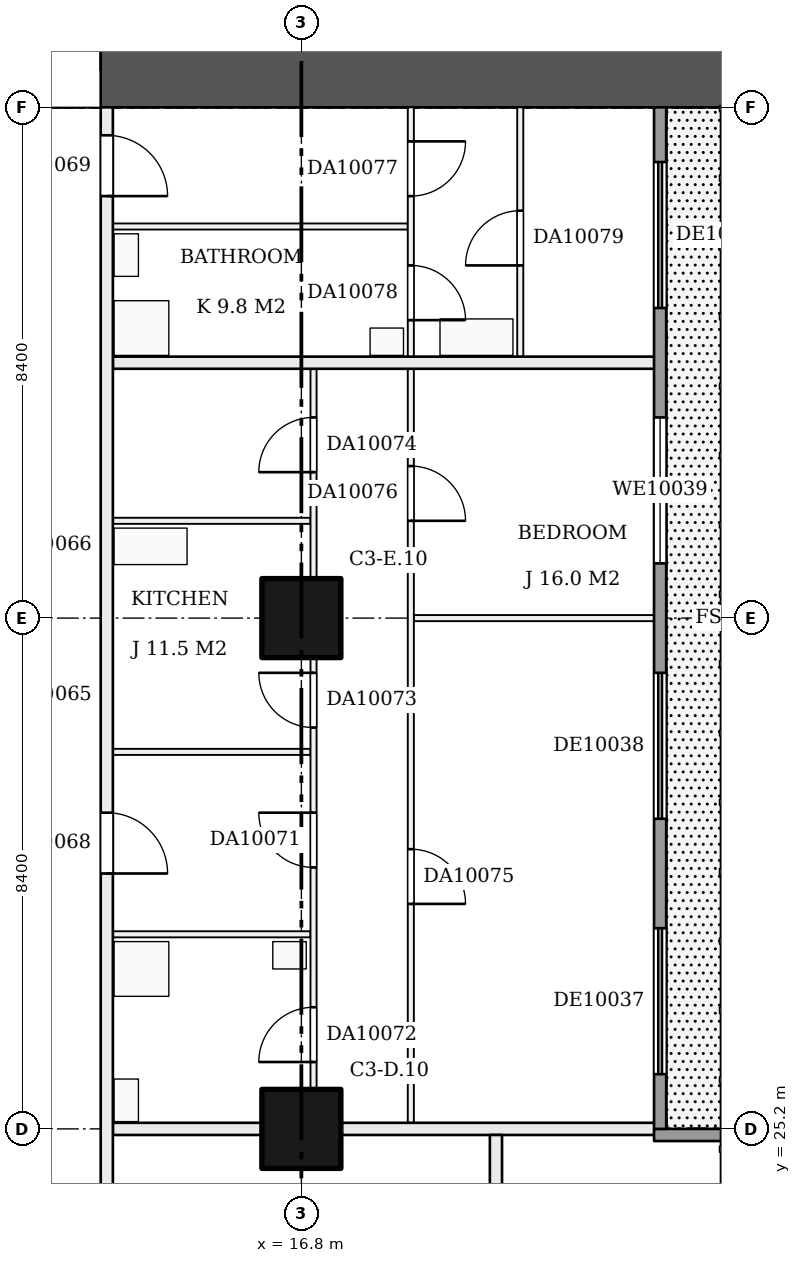
"""IFC4 building model, lengths in metres.
Left out: names, types, materials, properties, quantities, classifications, styles, units other than length and angle.
Written with IfcOpenShell. Run it as: python <this file> out.ifc"""

import sys

from ifc_helpers import new_model, si_unit, direction, frame, frame_2d, origin, origin_2d, place, context, subcontext, project, spatial, rectangle, extrude, element, fill, save


model = new_model("IFC4")
c1 = context("Model", 3, precision=1e-05, world=origin(), true_north=direction((0.0, 1.0)))
c2 = subcontext(c1, "Body", "Model", "MODEL_VIEW")
j1 = project(units=[si_unit("LENGTHUNIT", "METRE"), si_unit("PLANEANGLEUNIT", "RADIAN")], contexts=[c1])
p1 = place(None, origin())
s1 = spatial("IfcSite", under=j1, at=p1, CompositionType="ELEMENT")
p2 = place(p1, origin())
s2 = spatial("IfcBuilding", under=s1, at=p2, CompositionType="ELEMENT")
p3 = place(p2, frame((0.0, 0.0, 46.2)))
s3 = spatial("IfcBuildingStorey", under=s2, at=p3, CompositionType="ELEMENT", Elevation=46.2)
for number, where, z_axis, x_axis in (
    (1, (16.8, 25.2, 0.0), (0.0, 0.0, 1.0), (1.0, 0.0, 0.0)),
    (2, (16.8, 33.6, 0.0), (0.0, 0.0, 1.0), (1.0, 0.0, 0.0)),
):
    element("IfcColumn", number, at=place(p3, frame(where, z_axis=z_axis, x_axis=x_axis)), inside=s3, PredefinedType="COLUMN", context=c2, shape_type="SweptSolid", body=[
        extrude(rectangle(XDim=1.3, YDim=1.3, at=origin_2d()), origin(), (0.0, 0.0, 1.0), 3.22),
    ])
p4 = place(p3, frame((9.6, 42.6, 0.0), z_axis=(0.0, 0.0, 1.0), x_axis=(1.0, 0.0, 0.0)))
e3 = element("IfcWall", 3, at=p4, inside=s3, PredefinedType="SHEAR", context=c2, shape_type="SweptSolid", body=[
    extrude(rectangle(XDim=14.4, YDim=1.2, at=frame_2d((7.2, 0.0))), origin(), (0.0, 0.0, 1.0), 3.22),
])
p5 = place(p4, frame((2.1, 0.0, 0.0)))
e4 = element("IfcOpeningElement", 4, at=p5, cuts=e3, PredefinedType="OPENING", context=c2, shape_type="SweptSolid", body=[
    extrude(rectangle(XDim=1.8, YDim=2.1, at=frame_2d((0.9, 1.05))), frame((0.0, 0.61, 0.0), z_axis=(0.0, -1.0, 0.0), x_axis=(1.0, 0.0, 0.0)), (0.0, 0.0, 1.0), 1.22),
])
p6 = place(p3, frame((13.7, 25.2, 0.0), z_axis=(0.0, 0.0, 1.0), x_axis=(1.0, 0.0, 0.0)))
e5 = element("IfcWall", 5, at=p6, inside=s3, PredefinedType="PARTITIONING", context=c2, shape_type="SweptSolid", body=[
    extrude(rectangle(XDim=9.0, YDim=0.2, at=frame_2d((4.5, 0.0))), origin(), (0.0, 0.0, 1.0), 3.22),
])
for number, where, z_axis, x_axis in (
    (6, (13.7, 28.4, 0.0), (0.0, 0.0, 1.0), (1.0, 0.0, 0.0)),
    (7, (13.7, 31.4, 0.0), (0.0, 0.0, 1.0), (1.0, 0.0, 0.0)),
):
    element("IfcWall", number, at=place(p3, frame(where, z_axis=z_axis, x_axis=x_axis)), inside=s3, PredefinedType="PARTITIONING", context=c2, shape_type="SweptSolid", body=[
        extrude(rectangle(XDim=3.25, YDim=0.1, at=frame_2d((1.625, 0.0))), origin(), (0.0, 0.0, 1.0), 3.22),
    ])
p7 = place(p3, frame((18.65, 33.6, 0.0), z_axis=(0.0, 0.0, 1.0), x_axis=(1.0, 0.0, 0.0)))
e8 = element("IfcWall", 8, at=p7, inside=s3, PredefinedType="PARTITIONING", context=c2, shape_type="SweptSolid", body=[
    extrude(rectangle(XDim=4.05, YDim=0.1, at=frame_2d((2.025, 0.0))), origin(), (0.0, 0.0, 1.0), 3.22),
])
p8 = place(p3, frame((13.7, 35.2, 0.0), z_axis=(0.0, 0.0, 1.0), x_axis=(1.0, 0.0, 0.0)))
e9 = element("IfcWall", 9, at=p8, inside=s3, PredefinedType="PARTITIONING", context=c2, shape_type="SweptSolid", body=[
    extrude(rectangle(XDim=3.25, YDim=0.1, at=frame_2d((1.625, 0.0))), origin(), (0.0, 0.0, 1.0), 3.22),
])
p9 = place(p3, frame((13.7, 37.8, 0.0), z_axis=(0.0, 0.0, 1.0), x_axis=(1.0, 0.0, 0.0)))
e10 = element("IfcWall", 10, at=p9, inside=s3, PredefinedType="PARTITIONING", context=c2, shape_type="SweptSolid", body=[
    extrude(rectangle(XDim=9.0, YDim=0.2, at=frame_2d((4.5, 0.0))), origin(), (0.0, 0.0, 1.0), 3.22),
])
p10 = place(p3, frame((13.7, 40.04, 0.0), z_axis=(0.0, 0.0, 1.0), x_axis=(1.0, 0.0, 0.0)))
e11 = element("IfcWall", 11, at=p10, inside=s3, PredefinedType="PARTITIONING", context=c2, shape_type="SweptSolid", body=[
    extrude(rectangle(XDim=4.85, YDim=0.1, at=frame_2d((2.425, 0.0))), origin(), (0.0, 0.0, 1.0), 3.22),
])
p11 = place(p3, frame((13.6, 20.8, 0.0), z_axis=(0.0, 0.0, 1.0), x_axis=(0.0, 1.0, 0.0)))
e12 = element("IfcWall", 12, at=p11, inside=s3, PredefinedType="PARTITIONING", context=c2, shape_type="SweptSolid", body=[
    extrude(rectangle(XDim=21.2, YDim=0.2, at=frame_2d((10.6, 0.0))), origin(), (0.0, 0.0, 1.0), 3.22),
])
p12 = place(p11, frame((8.6, 0.0, 0.0)))
e13 = element("IfcOpeningElement", 13, at=p12, cuts=e12, PredefinedType="OPENING", context=c2, shape_type="SweptSolid", body=[
    extrude(rectangle(XDim=1.0, YDim=2.1, at=frame_2d((0.5, 1.05))), frame((0.0, 0.11, 0.0), z_axis=(0.0, -1.0, 0.0), x_axis=(1.0, 0.0, 0.0)), (0.0, 0.0, 1.0), 0.22),
])
p13 = place(p11, frame((19.74, 0.0, 0.0)))
e14 = element("IfcOpeningElement", 14, at=p13, cuts=e12, PredefinedType="OPENING", context=c2, shape_type="SweptSolid", body=[
    extrude(rectangle(XDim=1.0, YDim=2.1, at=frame_2d((0.5, 1.05))), frame((0.0, 0.11, 0.0), z_axis=(0.0, -1.0, 0.0), x_axis=(1.0, 0.0, 0.0)), (0.0, 0.0, 1.0), 0.22),
])
p14 = place(p11, frame((1.7, 0.0, 0.0)))
e15 = element("IfcOpeningElement", 15, at=p14, cuts=e12, PredefinedType="OPENING", context=c2, shape_type="SweptSolid", body=[
    extrude(rectangle(XDim=1.0, YDim=2.1, at=frame_2d((0.5, 1.05))), frame((0.0, 0.11, 0.0), z_axis=(0.0, -1.0, 0.0), x_axis=(1.0, 0.0, 0.0)), (0.0, 0.0, 1.0), 0.22),
])
p15 = place(p3, frame((17.0, 25.3, 0.0), z_axis=(0.0, 0.0, 1.0), x_axis=(0.0, 1.0, 0.0)))
e16 = element("IfcWall", 16, at=p15, inside=s3, PredefinedType="PARTITIONING", context=c2, shape_type="SweptSolid", body=[
    extrude(rectangle(XDim=12.4, YDim=0.1, at=frame_2d((6.2, 0.0))), origin(), (0.0, 0.0, 1.0), 3.22),
])
p16 = place(p15, frame((4.2, 0.0, 0.0)))
e17 = element("IfcOpeningElement", 17, at=p16, cuts=e16, PredefinedType="OPENING", context=c2, shape_type="SweptSolid", body=[
    extrude(rectangle(XDim=0.9, YDim=2.1, at=frame_2d((0.45, 1.05))), frame((0.0, 0.06, 0.0), z_axis=(0.0, -1.0, 0.0), x_axis=(1.0, 0.0, 0.0)), (0.0, 0.0, 1.0), 0.12),
])
p17 = place(p15, frame((1.0, 0.0, 0.0)))
e18 = element("IfcOpeningElement", 18, at=p17, cuts=e16, PredefinedType="OPENING", context=c2, shape_type="SweptSolid", body=[
    extrude(rectangle(XDim=0.9, YDim=2.1, at=frame_2d((0.45, 1.05))), frame((0.0, 0.06, 0.0), z_axis=(0.0, -1.0, 0.0), x_axis=(1.0, 0.0, 0.0)), (0.0, 0.0, 1.0), 0.12),
])
p18 = place(p15, frame((6.5, 0.0, 0.0)))
e19 = element("IfcOpeningElement", 19, at=p18, cuts=e16, PredefinedType="OPENING", context=c2, shape_type="SweptSolid", body=[
    extrude(rectangle(XDim=0.9, YDim=2.1, at=frame_2d((0.45, 1.05))), frame((0.0, 0.06, 0.0), z_axis=(0.0, -1.0, 0.0), x_axis=(1.0, 0.0, 0.0)), (0.0, 0.0, 1.0), 0.12),
])
p19 = place(p15, frame((10.7, 0.0, 0.0)))
e20 = element("IfcOpeningElement", 20, at=p19, cuts=e16, PredefinedType="OPENING", context=c2, shape_type="SweptSolid", body=[
    extrude(rectangle(XDim=0.9, YDim=2.1, at=frame_2d((0.45, 1.05))), frame((0.0, 0.06, 0.0), z_axis=(0.0, -1.0, 0.0), x_axis=(1.0, 0.0, 0.0)), (0.0, 0.0, 1.0), 0.12),
])
p20 = place(p3, frame((18.6, 25.3, 0.0), z_axis=(0.0, 0.0, 1.0), x_axis=(0.0, 1.0, 0.0)))
e21 = element("IfcWall", 21, at=p20, inside=s3, PredefinedType="PARTITIONING", context=c2, shape_type="SweptSolid", body=[
    extrude(rectangle(XDim=16.7, YDim=0.1, at=frame_2d((8.35, 0.0))), origin(), (0.0, 0.0, 1.0), 3.22),
])
p21 = place(p20, frame((3.6, 0.0, 0.0)))
e22 = element("IfcOpeningElement", 22, at=p21, cuts=e21, PredefinedType="OPENING", context=c2, shape_type="SweptSolid", body=[
    extrude(rectangle(XDim=0.9, YDim=2.1, at=frame_2d((0.45, 1.05))), frame((0.0, 0.06, 0.0), z_axis=(0.0, -1.0, 0.0), x_axis=(1.0, 0.0, 0.0)), (0.0, 0.0, 1.0), 0.12),
])
p22 = place(p20, frame((9.9, 0.0, 0.0)))
e23 = element("IfcOpeningElement", 23, at=p22, cuts=e21, PredefinedType="OPENING", context=c2, shape_type="SweptSolid", body=[
    extrude(rectangle(XDim=0.9, YDim=2.1, at=frame_2d((0.45, 1.05))), frame((0.0, 0.06, 0.0), z_axis=(0.0, -1.0, 0.0), x_axis=(1.0, 0.0, 0.0)), (0.0, 0.0, 1.0), 0.12),
])
p23 = place(p20, frame((15.24, 0.0, 0.0)))
e24 = element("IfcOpeningElement", 24, at=p23, cuts=e21, PredefinedType="OPENING", context=c2, shape_type="SweptSolid", body=[
    extrude(rectangle(XDim=0.9, YDim=2.1, at=frame_2d((0.45, 1.05))), frame((0.0, 0.06, 0.0), z_axis=(0.0, -1.0, 0.0), x_axis=(1.0, 0.0, 0.0)), (0.0, 0.0, 1.0), 0.12),
])
p24 = place(p20, frame((13.2, 0.0, 0.0)))
e25 = element("IfcOpeningElement", 25, at=p24, cuts=e21, PredefinedType="OPENING", context=c2, shape_type="SweptSolid", body=[
    extrude(rectangle(XDim=0.9, YDim=2.1, at=frame_2d((0.45, 1.05))), frame((0.0, 0.06, 0.0), z_axis=(0.0, -1.0, 0.0), x_axis=(1.0, 0.0, 0.0)), (0.0, 0.0, 1.0), 0.12),
])
p25 = place(p3, frame((20.0, 13.7, 0.0), z_axis=(0.0, 0.0, 1.0), x_axis=(0.0, 1.0, 0.0)))
e26 = element("IfcWall", 26, at=p25, inside=s3, PredefinedType="PARTITIONING", context=c2, shape_type="SweptSolid", body=[
    extrude(rectangle(XDim=11.4, YDim=0.2, at=frame_2d((5.7, 0.0))), origin(), (0.0, 0.0, 1.0), 3.22),
])
p26 = place(p3, frame((20.4, 37.9, 0.0), z_axis=(0.0, 0.0, 1.0), x_axis=(0.0, 1.0, 0.0)))
e27 = element("IfcWall", 27, at=p26, inside=s3, PredefinedType="PARTITIONING", context=c2, shape_type="SweptSolid", body=[
    extrude(rectangle(XDim=4.1, YDim=0.1, at=frame_2d((2.05, 0.0))), origin(), (0.0, 0.0, 1.0), 3.22),
])
p27 = place(p26, frame((1.5, 0.0, 0.0)))
e28 = element("IfcOpeningElement", 28, at=p27, cuts=e27, PredefinedType="OPENING", context=c2, shape_type="SweptSolid", body=[
    extrude(rectangle(XDim=0.9, YDim=2.1, at=frame_2d((0.45, 1.05))), frame((0.0, 0.06, 0.0), z_axis=(0.0, -1.0, 0.0), x_axis=(1.0, 0.0, 0.0)), (0.0, 0.0, 1.0), 0.12),
])
p28 = place(p3, frame((24.5, 25.1, 0.0), z_axis=(0.0, 0.0, 1.0), x_axis=(-1.0, 0.0, 0.0)))
e29 = element("IfcWall", 29, at=p28, inside=s3, PredefinedType="SOLIDWALL", context=c2, shape_type="SweptSolid", body=[
    extrude(rectangle(XDim=1.9, YDim=0.2, at=frame_2d((0.95, 0.0))), origin(), (0.0, 0.0, 1.0), 3.22),
])
p29 = place(p3, frame((22.7, 25.2, 0.0), z_axis=(0.0, 0.0, 1.0), x_axis=(0.0, 1.0, 0.0)))
e30 = element("IfcWall", 30, at=p29, inside=s3, PredefinedType="SOLIDWALL", context=c2, shape_type="SweptSolid", body=[
    extrude(rectangle(XDim=16.8, YDim=0.2, at=frame_2d((8.4, 0.0))), origin(), (0.0, 0.0, 1.0), 3.22),
])
p30 = place(p29, frame((0.9, 0.0, 0.0)))
e31 = element("IfcOpeningElement", 31, at=p30, cuts=e30, PredefinedType="OPENING", context=c2, shape_type="SweptSolid", body=[
    extrude(rectangle(XDim=2.4, YDim=2.2, at=frame_2d((1.2, 1.1))), frame((0.0, 0.11, 0.0), z_axis=(0.0, -1.0, 0.0), x_axis=(1.0, 0.0, 0.0)), (0.0, 0.0, 1.0), 0.22),
])
p31 = place(p29, frame((5.1, 0.0, 0.0)))
e32 = element("IfcOpeningElement", 32, at=p31, cuts=e30, PredefinedType="OPENING", context=c2, shape_type="SweptSolid", body=[
    extrude(rectangle(XDim=2.4, YDim=2.2, at=frame_2d((1.2, 1.1))), frame((0.0, 0.11, 0.0), z_axis=(0.0, -1.0, 0.0), x_axis=(1.0, 0.0, 0.0)), (0.0, 0.0, 1.0), 0.22),
])
p32 = place(p29, frame((9.3, 0.0, 0.9)))
e33 = element("IfcOpeningElement", 33, at=p32, cuts=e30, PredefinedType="OPENING", context=c2, shape_type="SweptSolid", body=[
    extrude(rectangle(XDim=2.4, YDim=1.5, at=frame_2d((1.2, 0.75))), frame((0.0, 0.11, 0.0), z_axis=(0.0, -1.0, 0.0), x_axis=(1.0, 0.0, 0.0)), (0.0, 0.0, 1.0), 0.22),
])
p33 = place(p29, frame((13.5, 0.0, 0.0)))
e34 = element("IfcOpeningElement", 34, at=p33, cuts=e30, PredefinedType="OPENING", context=c2, shape_type="SweptSolid", body=[
    extrude(rectangle(XDim=2.4, YDim=2.2, at=frame_2d((1.2, 1.1))), frame((0.0, 0.11, 0.0), z_axis=(0.0, -1.0, 0.0), x_axis=(1.0, 0.0, 0.0)), (0.0, 0.0, 1.0), 0.22),
])
p34 = place(p5, origin())
e35 = element("IfcDoor", 35, at=p34, inside=s3, OperationType="DOUBLE_DOOR_SINGLE_SWING", PredefinedType="DOOR", context=c2, shape_type="SweptSolid", body=[
    extrude(rectangle(XDim=1.8, YDim=2.1, at=frame_2d((0.9, 1.05))), frame((0.0, 0.025, 0.0), z_axis=(0.0, -1.0, 0.0), x_axis=(1.0, 0.0, 0.0)), (0.0, 0.0, 1.0), 0.05),
])
fill(e4, e35)
p35 = place(p12, frame((1.0, 0.0, 0.0), z_axis=(0.0, 0.0, 1.0), x_axis=(-1.0, 0.0, 0.0)))
e36 = element("IfcDoor", 36, at=p35, inside=s3, OperationType="SINGLE_SWING_RIGHT", PredefinedType="DOOR", context=c2, shape_type="SweptSolid", body=[
    extrude(rectangle(XDim=1.0, YDim=2.1, at=frame_2d((0.5, 1.05))), frame((0.0, 0.025, 0.0), z_axis=(0.0, -1.0, 0.0), x_axis=(1.0, 0.0, 0.0)), (0.0, 0.0, 1.0), 0.05),
])
fill(e13, e36)
p36 = place(p13, frame((1.0, 0.0, 0.0), z_axis=(0.0, 0.0, 1.0), x_axis=(-1.0, 0.0, 0.0)))
e37 = element("IfcDoor", 37, at=p36, inside=s3, OperationType="SINGLE_SWING_RIGHT", PredefinedType="DOOR", context=c2, shape_type="SweptSolid", body=[
    extrude(rectangle(XDim=1.0, YDim=2.1, at=frame_2d((0.5, 1.05))), frame((0.0, 0.025, 0.0), z_axis=(0.0, -1.0, 0.0), x_axis=(1.0, 0.0, 0.0)), (0.0, 0.0, 1.0), 0.05),
])
fill(e14, e37)
p37 = place(p16, origin())
e38 = element("IfcDoor", 38, at=p37, inside=s3, OperationType="SINGLE_SWING_RIGHT", PredefinedType="DOOR", context=c2, shape_type="SweptSolid", body=[
    extrude(rectangle(XDim=0.9, YDim=2.1, at=frame_2d((0.45, 1.05))), frame((0.0, 0.025, 0.0), z_axis=(0.0, -1.0, 0.0), x_axis=(1.0, 0.0, 0.0)), (0.0, 0.0, 1.0), 0.05),
])
fill(e17, e38)
p38 = place(p17, origin())
e39 = element("IfcDoor", 39, at=p38, inside=s3, OperationType="SINGLE_SWING_LEFT", PredefinedType="DOOR", context=c2, shape_type="SweptSolid", body=[
    extrude(rectangle(XDim=0.9, YDim=2.1, at=frame_2d((0.45, 1.05))), frame((0.0, 0.025, 0.0), z_axis=(0.0, -1.0, 0.0), x_axis=(1.0, 0.0, 0.0)), (0.0, 0.0, 1.0), 0.05),
])
fill(e18, e39)
p39 = place(p18, origin())
e40 = element("IfcDoor", 40, at=p39, inside=s3, OperationType="SINGLE_SWING_RIGHT", PredefinedType="DOOR", context=c2, shape_type="SweptSolid", body=[
    extrude(rectangle(XDim=0.9, YDim=2.1, at=frame_2d((0.45, 1.05))), frame((0.0, 0.025, 0.0), z_axis=(0.0, -1.0, 0.0), x_axis=(1.0, 0.0, 0.0)), (0.0, 0.0, 1.0), 0.05),
])
fill(e19, e40)
p40 = place(p19, origin())
e41 = element("IfcDoor", 41, at=p40, inside=s3, OperationType="SINGLE_SWING_LEFT", PredefinedType="DOOR", context=c2, shape_type="SweptSolid", body=[
    extrude(rectangle(XDim=0.9, YDim=2.1, at=frame_2d((0.45, 1.05))), frame((0.0, 0.025, 0.0), z_axis=(0.0, -1.0, 0.0), x_axis=(1.0, 0.0, 0.0)), (0.0, 0.0, 1.0), 0.05),
])
fill(e20, e41)
p41 = place(p21, frame((0.9, 0.0, 0.0), z_axis=(0.0, 0.0, 1.0), x_axis=(-1.0, 0.0, 0.0)))
e42 = element("IfcDoor", 42, at=p41, inside=s3, OperationType="SINGLE_SWING_RIGHT", PredefinedType="DOOR", context=c2, shape_type="SweptSolid", body=[
    extrude(rectangle(XDim=0.9, YDim=2.1, at=frame_2d((0.45, 1.05))), frame((0.0, 0.025, 0.0), z_axis=(0.0, -1.0, 0.0), x_axis=(1.0, 0.0, 0.0)), (0.0, 0.0, 1.0), 0.05),
])
fill(e22, e42)
p42 = place(p22, frame((0.9, 0.0, 0.0), z_axis=(0.0, 0.0, 1.0), x_axis=(-1.0, 0.0, 0.0)))
e43 = element("IfcDoor", 43, at=p42, inside=s3, OperationType="SINGLE_SWING_RIGHT", PredefinedType="DOOR", context=c2, shape_type="SweptSolid", body=[
    extrude(rectangle(XDim=0.9, YDim=2.1, at=frame_2d((0.45, 1.05))), frame((0.0, 0.025, 0.0), z_axis=(0.0, -1.0, 0.0), x_axis=(1.0, 0.0, 0.0)), (0.0, 0.0, 1.0), 0.05),
])
fill(e23, e43)
p43 = place(p23, frame((0.9, 0.0, 0.0), z_axis=(0.0, 0.0, 1.0), x_axis=(-1.0, 0.0, 0.0)))
e44 = element("IfcDoor", 44, at=p43, inside=s3, OperationType="SINGLE_SWING_LEFT", PredefinedType="DOOR", context=c2, shape_type="SweptSolid", body=[
    extrude(rectangle(XDim=0.9, YDim=2.1, at=frame_2d((0.45, 1.05))), frame((0.0, 0.025, 0.0), z_axis=(0.0, -1.0, 0.0), x_axis=(1.0, 0.0, 0.0)), (0.0, 0.0, 1.0), 0.05),
])
fill(e24, e44)
p44 = place(p24, frame((0.9, 0.0, 0.0), z_axis=(0.0, 0.0, 1.0), x_axis=(-1.0, 0.0, 0.0)))
e45 = element("IfcDoor", 45, at=p44, inside=s3, OperationType="SINGLE_SWING_RIGHT", PredefinedType="DOOR", context=c2, shape_type="SweptSolid", body=[
    extrude(rectangle(XDim=0.9, YDim=2.1, at=frame_2d((0.45, 1.05))), frame((0.0, 0.025, 0.0), z_axis=(0.0, -1.0, 0.0), x_axis=(1.0, 0.0, 0.0)), (0.0, 0.0, 1.0), 0.05),
])
fill(e25, e45)
p45 = place(p27, origin())
e46 = element("IfcDoor", 46, at=p45, inside=s3, OperationType="SINGLE_SWING_LEFT", PredefinedType="DOOR", context=c2, shape_type="SweptSolid", body=[
    extrude(rectangle(XDim=0.9, YDim=2.1, at=frame_2d((0.45, 1.05))), frame((0.0, 0.025, 0.0), z_axis=(0.0, -1.0, 0.0), x_axis=(1.0, 0.0, 0.0)), (0.0, 0.0, 1.0), 0.05),
])
fill(e28, e46)
p46 = place(p30, origin())
e47 = element("IfcDoor", 47, at=p46, inside=s3, OperationType="DOUBLE_DOOR_SLIDING", PredefinedType="DOOR", context=c2, shape_type="SweptSolid", body=[
    extrude(rectangle(XDim=2.4, YDim=2.2, at=frame_2d((1.2, 1.1))), frame((0.0, 0.025, 0.0), z_axis=(0.0, -1.0, 0.0), x_axis=(1.0, 0.0, 0.0)), (0.0, 0.0, 1.0), 0.05),
])
fill(e31, e47)
p47 = place(p31, origin())
e48 = element("IfcDoor", 48, at=p47, inside=s3, OperationType="DOUBLE_DOOR_SLIDING", PredefinedType="DOOR", context=c2, shape_type="SweptSolid", body=[
    extrude(rectangle(XDim=2.4, YDim=2.2, at=frame_2d((1.2, 1.1))), frame((0.0, 0.025, 0.0), z_axis=(0.0, -1.0, 0.0), x_axis=(1.0, 0.0, 0.0)), (0.0, 0.0, 1.0), 0.05),
])
fill(e32, e48)
p48 = place(p32, origin())
e49 = element("IfcWindow", 49, at=p48, inside=s3, PartitioningType="SINGLE_PANEL", PredefinedType="WINDOW", context=c2, shape_type="SweptSolid", body=[
    extrude(rectangle(XDim=2.4, YDim=1.5, at=frame_2d((1.2, 0.75))), frame((0.0, 0.03, 0.0), z_axis=(0.0, -1.0, 0.0), x_axis=(1.0, 0.0, 0.0)), (0.0, 0.0, 1.0), 0.06),
])
fill(e33, e49)
p49 = place(p33, origin())
e50 = element("IfcDoor", 50, at=p49, inside=s3, OperationType="DOUBLE_DOOR_SLIDING", PredefinedType="DOOR", context=c2, shape_type="SweptSolid", body=[
    extrude(rectangle(XDim=2.4, YDim=2.2, at=frame_2d((1.2, 1.1))), frame((0.0, 0.025, 0.0), z_axis=(0.0, -1.0, 0.0), x_axis=(1.0, 0.0, 0.0)), (0.0, 0.0, 1.0), 0.05),
])
fill(e34, e50)
save(model, sys.argv[1])
